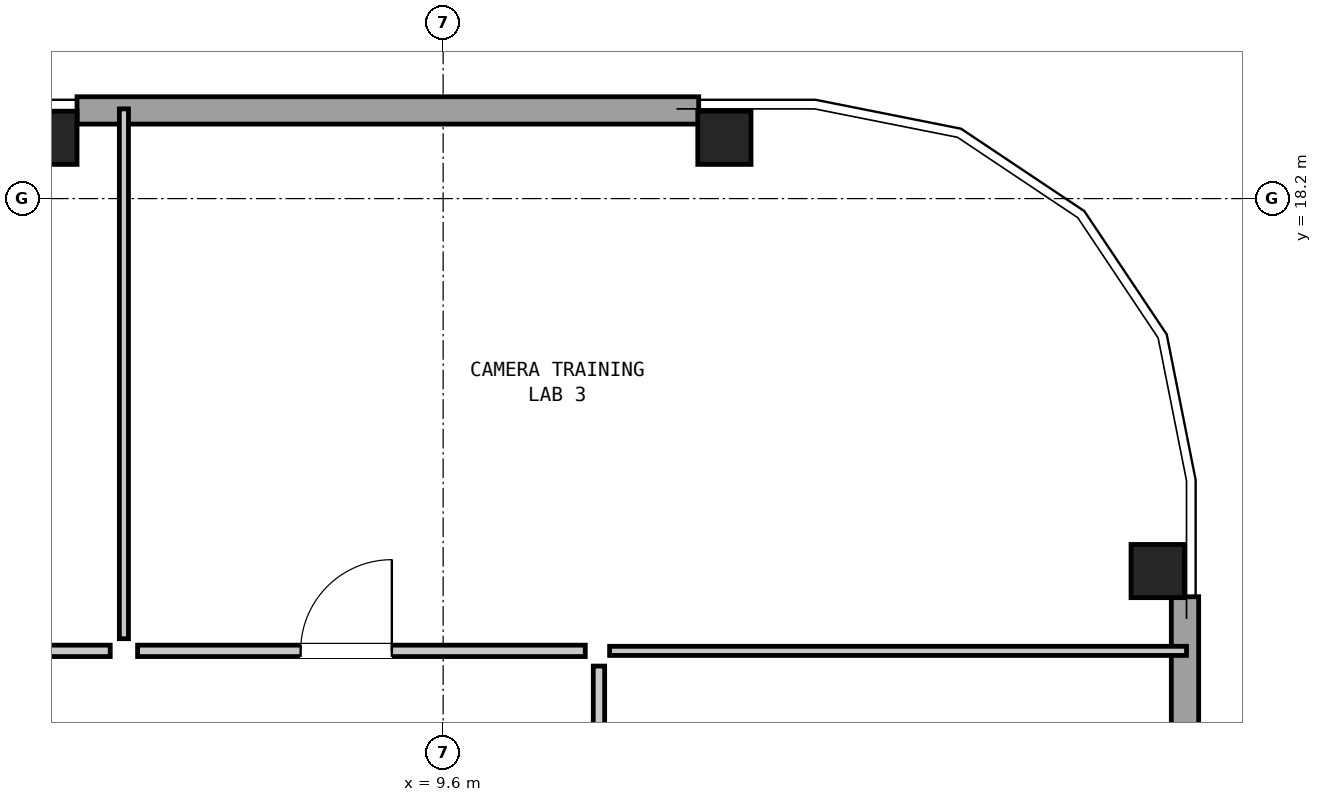
"""IFC4 building model, lengths in metres.
Left out: names, types, materials, properties, quantities, classifications, styles, units other than length and angle.
Written with IfcOpenShell. Run it as: python <this file> out.ifc"""

import sys

from ifc_helpers import new_model, si_unit, direction, frame, frame_2d, origin, origin_2d, place, context, subcontext, project, spatial, rectangle, hollow_rectangle, extrude, element, fill, save


model = new_model("IFC4")
c1 = context("Model", 3, precision=1e-05, world=origin(), true_north=direction((0.0, 1.0)))
c2 = subcontext(c1, "Body", "Model", "MODEL_VIEW")
j1 = project(units=[si_unit("LENGTHUNIT", "METRE"), si_unit("PLANEANGLEUNIT", "RADIAN")], contexts=[c1])
p1 = place(None, origin())
s1 = spatial("IfcSite", under=j1, at=p1, CompositionType="ELEMENT")
p2 = place(p1, origin())
s2 = spatial("IfcBuilding", under=s1, at=p2, CompositionType="ELEMENT")
p3 = place(p2, frame((0.0, 0.0, 223.9)))
s3 = spatial("IfcBuildingStorey", under=s2, at=p3, CompositionType="ELEMENT", Elevation=223.9)
for number, where, z_axis, x_axis in (
    (1, (19.0, 13.3, 0.0), (0.0, 0.0, 1.0), (0.0, 1.0, 0.0)),
    (2, (13.3, 19.0, 0.0), (0.0, 0.0, 1.0), (1.0, 0.0, 0.0)),
    (3, (4.433, 19.0, 0.0), (0.0, 0.0, 1.0), (1.0, 0.0, 0.0)),
):
    element("IfcColumn", number, at=place(p3, frame(where, z_axis=z_axis, x_axis=x_axis)), inside=s3, PredefinedType="COLUMN", context=c2, shape_type="SweptSolid", body=[
        extrude(hollow_rectangle(XDim=0.7, YDim=0.7, WallThickness=0.045, at=origin_2d()), origin(), (0.0, 0.0, 1.0), 3.05),
    ])
for number, where, z_axis, x_axis in (
    (4, (19.36, 12.962, 0.0), (0.0, 0.0, 1.0), (0.0, -1.0, 0.0)),
    (5, (4.783, 19.36, 0.0), (0.0, 0.0, 1.0), (1.0, 0.0, 0.0)),
):
    element("IfcWall", number, at=place(p3, frame(where, z_axis=z_axis, x_axis=x_axis)), inside=s3, PredefinedType="SOLIDWALL", context=c2, shape_type="SweptSolid", body=[
        extrude(rectangle(XDim=8.179, YDim=0.36, at=frame_2d((4.089, 0.0))), origin(), (0.0, 0.0, 1.0), 0.98),
    ])
p4 = place(p3, frame((11.79, 12.25, 0.0), z_axis=(0.0, 0.0, 1.0), x_axis=(1.0, 0.0, 0.0)))
e6 = element("IfcWall", 6, at=p4, inside=s3, PredefinedType="PARTITIONING", context=c2, shape_type="SweptSolid", body=[
    extrude(rectangle(XDim=7.59, YDim=0.12, at=frame_2d((3.795, 0.0))), origin(), (0.0, 0.0, 1.0), 2.86),
])
p5 = place(p3, frame((5.4, 12.41, 0.0), z_axis=(0.0, 0.0, 1.0), x_axis=(0.0, 1.0, 0.0)))
e7 = element("IfcWall", 7, at=p5, inside=s3, PredefinedType="PARTITIONING", context=c2, shape_type="SweptSolid", body=[
    extrude(rectangle(XDim=6.97, YDim=0.12, at=frame_2d((3.485, 0.0))), origin(), (0.0, 0.0, 1.0), 2.86),
])
p6 = place(p3, frame((-5.22, 12.25, 0.0), z_axis=(0.0, 0.0, 1.0), x_axis=(1.0, 0.0, 0.0)))
e8 = element("IfcWall", 8, at=p6, inside=s3, PredefinedType="PARTITIONING", context=c2, shape_type="SweptSolid", body=[
    extrude(rectangle(XDim=10.44, YDim=0.15, at=frame_2d((5.22, 0.0))), origin(), (0.0, 0.0, 1.0), 2.86),
])
p7 = place(p6, frame((4.62, 0.0, 0.0)))
e9 = element("IfcOpeningElement", 9, at=p7, cuts=e8, PredefinedType="OPENING", context=c2, shape_type="SweptSolid", body=[
    extrude(rectangle(XDim=1.2, YDim=2.1, at=frame_2d((0.6, 1.05))), frame((0.0, 0.087, 0.0), z_axis=(0.0, -1.0, 0.0), x_axis=(1.0, 0.0, 0.0)), (0.0, 0.0, 1.0), 0.174),
])
p8 = place(p3, frame((5.58, 12.25, 0.0), z_axis=(0.0, 0.0, 1.0), x_axis=(1.0, 0.0, 0.0)))
e10 = element("IfcWall", 10, at=p8, inside=s3, PredefinedType="PARTITIONING", context=c2, shape_type="SweptSolid", body=[
    extrude(rectangle(XDim=5.89, YDim=0.15, at=frame_2d((2.945, 0.0))), origin(), (0.0, 0.0, 1.0), 2.86),
])
p9 = place(p8, frame((2.145, 0.0, 0.0)))
e11 = element("IfcOpeningElement", 11, at=p9, cuts=e10, PredefinedType="OPENING", context=c2, shape_type="SweptSolid", body=[
    extrude(rectangle(XDim=1.2, YDim=2.1, at=frame_2d((0.6, 1.05))), frame((0.0, 0.087, 0.0), z_axis=(0.0, -1.0, 0.0), x_axis=(1.0, 0.0, 0.0)), (0.0, 0.0, 1.0), 0.174),
])
p10 = place(p3, frame((11.65, 3.8, 0.0), z_axis=(0.0, 0.0, 1.0), x_axis=(0.0, 1.0, 0.0)))
e12 = element("IfcWall", 12, at=p10, inside=s3, PredefinedType="PARTITIONING", context=c2, shape_type="SweptSolid", body=[
    extrude(rectangle(XDim=8.25, YDim=0.15, at=frame_2d((4.125, 0.0))), origin(), (0.0, 0.0, 1.0), 2.86),
])
p11 = place(p10, frame((3.65, 0.0, 0.0)))
e13 = element("IfcOpeningElement", 13, at=p11, cuts=e12, PredefinedType="OPENING", context=c2, shape_type="SweptSolid", body=[
    extrude(rectangle(XDim=0.95, YDim=2.1, at=frame_2d((0.475, 1.05))), frame((0.0, 0.087, 0.0), z_axis=(0.0, -1.0, 0.0), x_axis=(1.0, 0.0, 0.0)), (0.0, 0.0, 1.0), 0.174),
])
p12 = place(p9, origin())
e14 = element("IfcDoor", 14, at=p12, inside=s3, OperationType="SINGLE_SWING_RIGHT", PredefinedType="DOOR", context=c2, shape_type="SweptSolid", body=[
    extrude(rectangle(XDim=1.2, YDim=2.1, at=frame_2d((0.6, 1.05))), frame((0.0, 0.025, 0.0), z_axis=(0.0, -1.0, 0.0), x_axis=(1.0, 0.0, 0.0)), (0.0, 0.0, 1.0), 0.05),
])
fill(e11, e14)
save(model, sys.argv[1])
